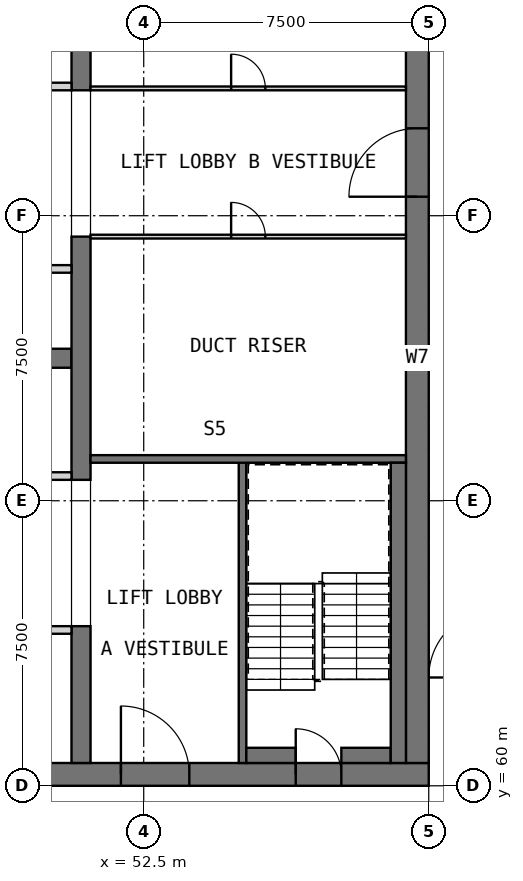
"""IFC4 building model, lengths in metres.
Left out: names, types, materials, properties, quantities, classifications, styles, units other than length and angle.
Written with IfcOpenShell. Run it as: python <this file> out.ifc"""

import sys

from ifc_helpers import new_model, si_unit, direction, frame, frame_2d, origin, place, context, subcontext, project, spatial, rectangle, extrude, element, fill, save


model = new_model("IFC4")
c1 = context("Model", 3, precision=1e-05, world=origin(), true_north=direction((0.0, 1.0)))
c2 = subcontext(c1, "Body", "Model", "MODEL_VIEW")
j1 = project(units=[si_unit("LENGTHUNIT", "METRE"), si_unit("PLANEANGLEUNIT", "RADIAN")], contexts=[c1])
p1 = place(None, origin())
s1 = spatial("IfcSite", under=j1, at=p1, CompositionType="ELEMENT")
p2 = place(p1, origin())
s2 = spatial("IfcBuilding", under=s1, at=p2, CompositionType="ELEMENT")
p3 = place(p2, frame((0.0, 0.0, 226.7)))
s3 = spatial("IfcBuildingStorey", under=s2, at=p3, CompositionType="ELEMENT", Elevation=226.7)
p4 = place(p3, frame((30.0, 60.3, 0.0), z_axis=(0.0, 0.0, 1.0), x_axis=(1.0, 0.0, 0.0)))
e1 = element("IfcWall", 1, at=p4, inside=s3, PredefinedType="SHEAR", context=c2, shape_type="SweptSolid", body=[
    extrude(rectangle(XDim=30.0, YDim=0.6, at=frame_2d((15.0, 0.0))), origin(), (0.0, 0.0, 1.0), 3.5),
])
p5 = place(p4, frame((21.9, 0.0, 0.0)))
e2 = element("IfcOpeningElement", 2, at=p5, cuts=e1, PredefinedType="OPENING", context=c2, shape_type="SweptSolid", body=[
    extrude(rectangle(XDim=1.8, YDim=2.1, at=frame_2d((0.9, 1.05))), frame((0.0, 0.31, 0.0), z_axis=(0.0, -1.0, 0.0), x_axis=(1.0, 0.0, 0.0)), (0.0, 0.0, 1.0), 0.62),
])
p6 = place(p4, frame((26.5, 0.0, 0.0)))
e3 = element("IfcOpeningElement", 3, at=p6, cuts=e1, PredefinedType="OPENING", context=c2, shape_type="SweptSolid", body=[
    extrude(rectangle(XDim=1.2, YDim=2.1, at=frame_2d((0.6, 1.05))), frame((0.0, 0.31, 0.0), z_axis=(0.0, -1.0, 0.0), x_axis=(1.0, 0.0, 0.0)), (0.0, 0.0, 1.0), 0.62),
])
p7 = place(p3, frame((59.7, 60.6, 0.0), z_axis=(0.0, 0.0, 1.0), x_axis=(0.0, 1.0, 0.0)))
e4 = element("IfcWall", 4, at=p7, inside=s3, PredefinedType="SHEAR", context=c2, shape_type="SweptSolid", body=[
    extrude(rectangle(XDim=21.3, YDim=0.6, at=frame_2d((10.65, 0.0))), origin(), (0.0, 0.0, 1.0), 3.5),
])
p8 = place(p7, frame((14.9, 0.0, 0.0)))
e5 = element("IfcOpeningElement", 5, at=p8, cuts=e4, PredefinedType="OPENING", context=c2, shape_type="SweptSolid", body=[
    extrude(rectangle(XDim=1.8, YDim=2.1, at=frame_2d((0.9, 1.05))), frame((0.0, 0.31, 0.0), z_axis=(0.0, -1.0, 0.0), x_axis=(1.0, 0.0, 0.0)), (0.0, 0.0, 1.0), 0.62),
])
p9 = place(p3, frame((35.0, 71.25, 0.0), z_axis=(0.0, 0.0, 1.0), x_axis=(1.0, 0.0, 0.0)))
e6 = element("IfcWall", 6, at=p9, inside=s3, PredefinedType="SHEAR", context=c2, shape_type="SweptSolid", body=[
    extrude(rectangle(XDim=15.6, YDim=0.5, at=frame_2d((7.8, 0.0))), origin(), (0.0, 0.0, 1.0), 3.5),
])
p10 = place(p3, frame((50.85, 60.6, 0.0), z_axis=(0.0, 0.0, 1.0), x_axis=(0.0, 1.0, 0.0)))
e7 = element("IfcWall", 7, at=p10, inside=s3, PredefinedType="SHEAR", context=c2, shape_type="SweptSolid", body=[
    extrude(rectangle(XDim=3.6, YDim=0.5, at=frame_2d((1.8, 0.0))), origin(), (0.0, 0.0, 1.0), 3.5),
])
p11 = place(p3, frame((50.85, 68.05, 0.0), z_axis=(0.0, 0.0, 1.0), x_axis=(0.0, 1.0, 0.0)))
e8 = element("IfcWall", 8, at=p11, inside=s3, PredefinedType="SHEAR", context=c2, shape_type="SweptSolid", body=[
    extrude(rectangle(XDim=6.4, YDim=0.5, at=frame_2d((3.2, 0.0))), origin(), (0.0, 0.0, 1.0), 3.5),
])
p12 = place(p3, frame((50.85, 78.3, 0.0), z_axis=(0.0, 0.0, 1.0), x_axis=(0.0, 1.0, 0.0)))
e9 = element("IfcWall", 9, at=p12, inside=s3, PredefinedType="SHEAR", context=c2, shape_type="SweptSolid", body=[
    extrude(rectangle(XDim=3.6, YDim=0.5, at=frame_2d((1.8, 0.0))), origin(), (0.0, 0.0, 1.0), 3.5),
])
p13 = place(p3, frame((35.0, 64.1, 0.0), z_axis=(0.0, 0.0, 1.0), x_axis=(1.0, 0.0, 0.0)))
e10 = element("IfcWall", 10, at=p13, inside=s3, PredefinedType="PARTITIONING", context=c2, shape_type="SweptSolid", body=[
    extrude(rectangle(XDim=15.6, YDim=0.2, at=frame_2d((7.8, 0.0))), origin(), (0.0, 0.0, 1.0), 3.25),
])
p14 = place(p13, frame((7.35, 0.0, 0.0)))
e11 = element("IfcOpeningElement", 11, at=p14, cuts=e10, PredefinedType="OPENING", context=c2, shape_type="SweptSolid", body=[
    extrude(rectangle(XDim=0.9, YDim=2.1, at=frame_2d((0.45, 1.05))), frame((0.0, 0.11, 0.0), z_axis=(0.0, -1.0, 0.0), x_axis=(1.0, 0.0, 0.0)), (0.0, 0.0, 1.0), 0.22),
])
p15 = place(p3, frame((35.0, 68.15, 0.0), z_axis=(0.0, 0.0, 1.0), x_axis=(1.0, 0.0, 0.0)))
e12 = element("IfcWall", 12, at=p15, inside=s3, PredefinedType="PARTITIONING", context=c2, shape_type="SweptSolid", body=[
    extrude(rectangle(XDim=15.6, YDim=0.2, at=frame_2d((7.8, 0.0))), origin(), (0.0, 0.0, 1.0), 3.25),
])
p16 = place(p15, frame((2.15, 0.0, 0.0)))
e13 = element("IfcOpeningElement", 13, at=p16, cuts=e12, PredefinedType="OPENING", context=c2, shape_type="SweptSolid", body=[
    extrude(rectangle(XDim=0.9, YDim=2.1, at=frame_2d((0.45, 1.05))), frame((0.0, 0.11, 0.0), z_axis=(0.0, -1.0, 0.0), x_axis=(1.0, 0.0, 0.0)), (0.0, 0.0, 1.0), 0.22),
])
p17 = place(p15, frame((7.35, 0.0, 0.0)))
e14 = element("IfcOpeningElement", 14, at=p17, cuts=e12, PredefinedType="OPENING", context=c2, shape_type="SweptSolid", body=[
    extrude(rectangle(XDim=0.9, YDim=2.1, at=frame_2d((0.45, 1.05))), frame((0.0, 0.11, 0.0), z_axis=(0.0, -1.0, 0.0), x_axis=(1.0, 0.0, 0.0)), (0.0, 0.0, 1.0), 0.22),
])
p18 = place(p15, frame((12.55, 0.0, 0.0)))
e15 = element("IfcOpeningElement", 15, at=p18, cuts=e12, PredefinedType="OPENING", context=c2, shape_type="SweptSolid", body=[
    extrude(rectangle(XDim=0.9, YDim=2.1, at=frame_2d((0.45, 1.05))), frame((0.0, 0.11, 0.0), z_axis=(0.0, -1.0, 0.0), x_axis=(1.0, 0.0, 0.0)), (0.0, 0.0, 1.0), 0.22),
])
p19 = place(p3, frame((35.0, 73.6, 0.0), z_axis=(0.0, 0.0, 1.0), x_axis=(1.0, 0.0, 0.0)))
e16 = element("IfcWall", 16, at=p19, inside=s3, PredefinedType="SOLIDWALL", context=c2, shape_type="SweptSolid", body=[
    extrude(rectangle(XDim=15.6, YDim=0.2, at=frame_2d((7.8, 0.0))), origin(), (0.0, 0.0, 1.0), 3.5),
])
p20 = place(p19, frame((0.75, 0.0, 0.0)))
e17 = element("IfcOpeningElement", 17, at=p20, cuts=e16, PredefinedType="OPENING", context=c2, shape_type="SweptSolid", body=[
    extrude(rectangle(XDim=1.1, YDim=2.1, at=frame_2d((0.55, 1.05))), frame((0.0, 0.11, 0.0), z_axis=(0.0, -1.0, 0.0), x_axis=(1.0, 0.0, 0.0)), (0.0, 0.0, 1.0), 0.22),
])
p21 = place(p19, frame((3.35, 0.0, 0.0)))
e18 = element("IfcOpeningElement", 18, at=p21, cuts=e16, PredefinedType="OPENING", context=c2, shape_type="SweptSolid", body=[
    extrude(rectangle(XDim=1.1, YDim=2.1, at=frame_2d((0.55, 1.05))), frame((0.0, 0.11, 0.0), z_axis=(0.0, -1.0, 0.0), x_axis=(1.0, 0.0, 0.0)), (0.0, 0.0, 1.0), 0.22),
])
p22 = place(p19, frame((5.95, 0.0, 0.0)))
e19 = element("IfcOpeningElement", 19, at=p22, cuts=e16, PredefinedType="OPENING", context=c2, shape_type="SweptSolid", body=[
    extrude(rectangle(XDim=1.1, YDim=2.1, at=frame_2d((0.55, 1.05))), frame((0.0, 0.11, 0.0), z_axis=(0.0, -1.0, 0.0), x_axis=(1.0, 0.0, 0.0)), (0.0, 0.0, 1.0), 0.22),
])
p23 = place(p19, frame((8.55, 0.0, 0.0)))
e20 = element("IfcOpeningElement", 20, at=p23, cuts=e16, PredefinedType="OPENING", context=c2, shape_type="SweptSolid", body=[
    extrude(rectangle(XDim=1.1, YDim=2.1, at=frame_2d((0.55, 1.05))), frame((0.0, 0.11, 0.0), z_axis=(0.0, -1.0, 0.0), x_axis=(1.0, 0.0, 0.0)), (0.0, 0.0, 1.0), 0.22),
])
p24 = place(p19, frame((11.15, 0.0, 0.0)))
e21 = element("IfcOpeningElement", 21, at=p24, cuts=e16, PredefinedType="OPENING", context=c2, shape_type="SweptSolid", body=[
    extrude(rectangle(XDim=1.1, YDim=2.1, at=frame_2d((0.55, 1.05))), frame((0.0, 0.11, 0.0), z_axis=(0.0, -1.0, 0.0), x_axis=(1.0, 0.0, 0.0)), (0.0, 0.0, 1.0), 0.22),
])
p25 = place(p19, frame((13.75, 0.0, 0.0)))
e22 = element("IfcOpeningElement", 22, at=p25, cuts=e16, PredefinedType="OPENING", context=c2, shape_type="SweptSolid", body=[
    extrude(rectangle(XDim=1.1, YDim=2.1, at=frame_2d((0.55, 1.05))), frame((0.0, 0.11, 0.0), z_axis=(0.0, -1.0, 0.0), x_axis=(1.0, 0.0, 0.0)), (0.0, 0.0, 1.0), 0.22),
])
p26 = place(p3, frame((35.0, 78.4, 0.0), z_axis=(0.0, 0.0, 1.0), x_axis=(1.0, 0.0, 0.0)))
e23 = element("IfcWall", 23, at=p26, inside=s3, PredefinedType="SOLIDWALL", context=c2, shape_type="SweptSolid", body=[
    extrude(rectangle(XDim=15.6, YDim=0.2, at=frame_2d((7.8, 0.0))), origin(), (0.0, 0.0, 1.0), 3.5),
])
p27 = place(p26, frame((0.75, 0.0, 0.0)))
e24 = element("IfcOpeningElement", 24, at=p27, cuts=e23, PredefinedType="OPENING", context=c2, shape_type="SweptSolid", body=[
    extrude(rectangle(XDim=1.1, YDim=2.1, at=frame_2d((0.55, 1.05))), frame((0.0, 0.11, 0.0), z_axis=(0.0, -1.0, 0.0), x_axis=(1.0, 0.0, 0.0)), (0.0, 0.0, 1.0), 0.22),
])
p28 = place(p26, frame((3.35, 0.0, 0.0)))
e25 = element("IfcOpeningElement", 25, at=p28, cuts=e23, PredefinedType="OPENING", context=c2, shape_type="SweptSolid", body=[
    extrude(rectangle(XDim=1.1, YDim=2.1, at=frame_2d((0.55, 1.05))), frame((0.0, 0.11, 0.0), z_axis=(0.0, -1.0, 0.0), x_axis=(1.0, 0.0, 0.0)), (0.0, 0.0, 1.0), 0.22),
])
p29 = place(p26, frame((11.15, 0.0, 0.0)))
e26 = element("IfcOpeningElement", 26, at=p29, cuts=e23, PredefinedType="OPENING", context=c2, shape_type="SweptSolid", body=[
    extrude(rectangle(XDim=1.1, YDim=2.1, at=frame_2d((0.55, 1.05))), frame((0.0, 0.11, 0.0), z_axis=(0.0, -1.0, 0.0), x_axis=(1.0, 0.0, 0.0)), (0.0, 0.0, 1.0), 0.22),
])
p30 = place(p26, frame((13.75, 0.0, 0.0)))
e27 = element("IfcOpeningElement", 27, at=p30, cuts=e23, PredefinedType="OPENING", context=c2, shape_type="SweptSolid", body=[
    extrude(rectangle(XDim=1.1, YDim=2.1, at=frame_2d((0.55, 1.05))), frame((0.0, 0.11, 0.0), z_axis=(0.0, -1.0, 0.0), x_axis=(1.0, 0.0, 0.0)), (0.0, 0.0, 1.0), 0.22),
])
p31 = place(p3, frame((55.1, 60.6, 0.0), z_axis=(0.0, 0.0, 1.0), x_axis=(0.0, 1.0, 0.0)))
e28 = element("IfcWall", 28, at=p31, inside=s3, PredefinedType="SOLIDWALL", context=c2, shape_type="SweptSolid", body=[
    extrude(rectangle(XDim=8.0, YDim=0.2, at=frame_2d((4.0, 0.0))), origin(), (0.0, 0.0, 1.0), 3.25),
])
p32 = place(p3, frame((51.1, 68.6, 0.0), z_axis=(0.0, 0.0, 1.0), x_axis=(1.0, 0.0, 0.0)))
e29 = element("IfcWall", 29, at=p32, inside=s3, PredefinedType="SOLIDWALL", context=c2, shape_type="SweptSolid", body=[
    extrude(rectangle(XDim=8.3, YDim=0.2, at=frame_2d((4.15, 0.0))), origin(), (0.0, 0.0, 1.0), 3.25),
])
for number, where, z_axis, x_axis in (
    (30, (55.2, 60.8, 0.0), (0.0, 0.0, 1.0), (1.0, 0.0, 0.0)),
    (31, (57.7, 60.8, 0.0), (0.0, 0.0, 1.0), (1.0, 0.0, 0.0)),
):
    element("IfcWall", number, at=place(p3, frame(where, z_axis=z_axis, x_axis=x_axis)), inside=s3, PredefinedType="SOLIDWALL", context=c2, shape_type="SweptSolid", body=[
        extrude(rectangle(XDim=1.3, YDim=0.4, at=frame_2d((0.65, 0.0))), origin(), (0.0, 0.0, 1.0), 3.25),
    ])
p33 = place(p3, frame((59.2, 60.6, 0.0), z_axis=(0.0, 0.0, 1.0), x_axis=(0.0, 1.0, 0.0)))
e32 = element("IfcWall", 32, at=p33, inside=s3, PredefinedType="SOLIDWALL", context=c2, shape_type="SweptSolid", body=[
    extrude(rectangle(XDim=7.9, YDim=0.4, at=frame_2d((3.95, 0.0))), origin(), (0.0, 0.0, 1.0), 3.25),
])
p34 = place(p3, frame((51.1, 74.45, 0.0), z_axis=(0.0, 0.0, 1.0), x_axis=(1.0, 0.0, 0.0)))
e33 = element("IfcWall", 33, at=p34, inside=s3, PredefinedType="PARTITIONING", context=c2, shape_type="SweptSolid", body=[
    extrude(rectangle(XDim=8.3, YDim=0.1, at=frame_2d((4.15, 0.0))), origin(), (0.0, 0.0, 1.0), 3.25),
])
p35 = place(p34, frame((3.7, 0.0, 0.0)))
e34 = element("IfcOpeningElement", 34, at=p35, cuts=e33, PredefinedType="OPENING", context=c2, shape_type="SweptSolid", body=[
    extrude(rectangle(XDim=0.9, YDim=2.1, at=frame_2d((0.45, 1.05))), frame((0.0, 0.06, 0.0), z_axis=(0.0, -1.0, 0.0), x_axis=(1.0, 0.0, 0.0)), (0.0, 0.0, 1.0), 0.12),
])
p36 = place(p3, frame((51.1, 78.35, 0.0), z_axis=(0.0, 0.0, 1.0), x_axis=(1.0, 0.0, 0.0)))
e35 = element("IfcWall", 35, at=p36, inside=s3, PredefinedType="PARTITIONING", context=c2, shape_type="SweptSolid", body=[
    extrude(rectangle(XDim=8.3, YDim=0.1, at=frame_2d((4.15, 0.0))), origin(), (0.0, 0.0, 1.0), 3.25),
])
p37 = place(p36, frame((3.7, 0.0, 0.0)))
e36 = element("IfcOpeningElement", 36, at=p37, cuts=e35, PredefinedType="OPENING", context=c2, shape_type="SweptSolid", body=[
    extrude(rectangle(XDim=0.9, YDim=2.1, at=frame_2d((0.45, 1.05))), frame((0.0, 0.06, 0.0), z_axis=(0.0, -1.0, 0.0), x_axis=(1.0, 0.0, 0.0)), (0.0, 0.0, 1.0), 0.12),
])
p38 = place(p5, origin())
e37 = element("IfcDoor", 37, at=p38, inside=s3, OperationType="DOUBLE_DOOR_SINGLE_SWING", PredefinedType="DOOR", context=c2, shape_type="SweptSolid", body=[
    extrude(rectangle(XDim=1.8, YDim=2.1, at=frame_2d((0.9, 1.05))), frame((0.0, 0.025, 0.0), z_axis=(0.0, -1.0, 0.0), x_axis=(1.0, 0.0, 0.0)), (0.0, 0.0, 1.0), 0.05),
])
fill(e2, e37)
p39 = place(p8, origin())
e38 = element("IfcDoor", 38, at=p39, inside=s3, OperationType="DOUBLE_DOOR_SINGLE_SWING", PredefinedType="DOOR", context=c2, shape_type="SweptSolid", body=[
    extrude(rectangle(XDim=1.8, YDim=2.1, at=frame_2d((0.9, 1.05))), frame((0.0, 0.025, 0.0), z_axis=(0.0, -1.0, 0.0), x_axis=(1.0, 0.0, 0.0)), (0.0, 0.0, 1.0), 0.05),
])
fill(e5, e38)
p40 = place(p6, origin())
e39 = element("IfcDoor", 39, at=p40, inside=s3, OperationType="SINGLE_SWING_LEFT", PredefinedType="DOOR", context=c2, shape_type="SweptSolid", body=[
    extrude(rectangle(XDim=1.2, YDim=2.1, at=frame_2d((0.6, 1.05))), frame((0.0, 0.025, 0.0), z_axis=(0.0, -1.0, 0.0), x_axis=(1.0, 0.0, 0.0)), (0.0, 0.0, 1.0), 0.05),
])
fill(e3, e39)
p41 = place(p35, origin())
e40 = element("IfcDoor", 40, at=p41, inside=s3, OperationType="SINGLE_SWING_RIGHT", PredefinedType="DOOR", context=c2, shape_type="SweptSolid", body=[
    extrude(rectangle(XDim=0.9, YDim=2.1, at=frame_2d((0.45, 1.05))), frame((0.0, 0.025, 0.0), z_axis=(0.0, -1.0, 0.0), x_axis=(1.0, 0.0, 0.0)), (0.0, 0.0, 1.0), 0.05),
])
fill(e34, e40)
p42 = place(p37, origin())
e41 = element("IfcDoor", 41, at=p42, inside=s3, OperationType="SINGLE_SWING_RIGHT", PredefinedType="DOOR", context=c2, shape_type="SweptSolid", body=[
    extrude(rectangle(XDim=0.9, YDim=2.1, at=frame_2d((0.45, 1.05))), frame((0.0, 0.025, 0.0), z_axis=(0.0, -1.0, 0.0), x_axis=(1.0, 0.0, 0.0)), (0.0, 0.0, 1.0), 0.05),
])
fill(e36, e41)
save(model, sys.argv[1])
